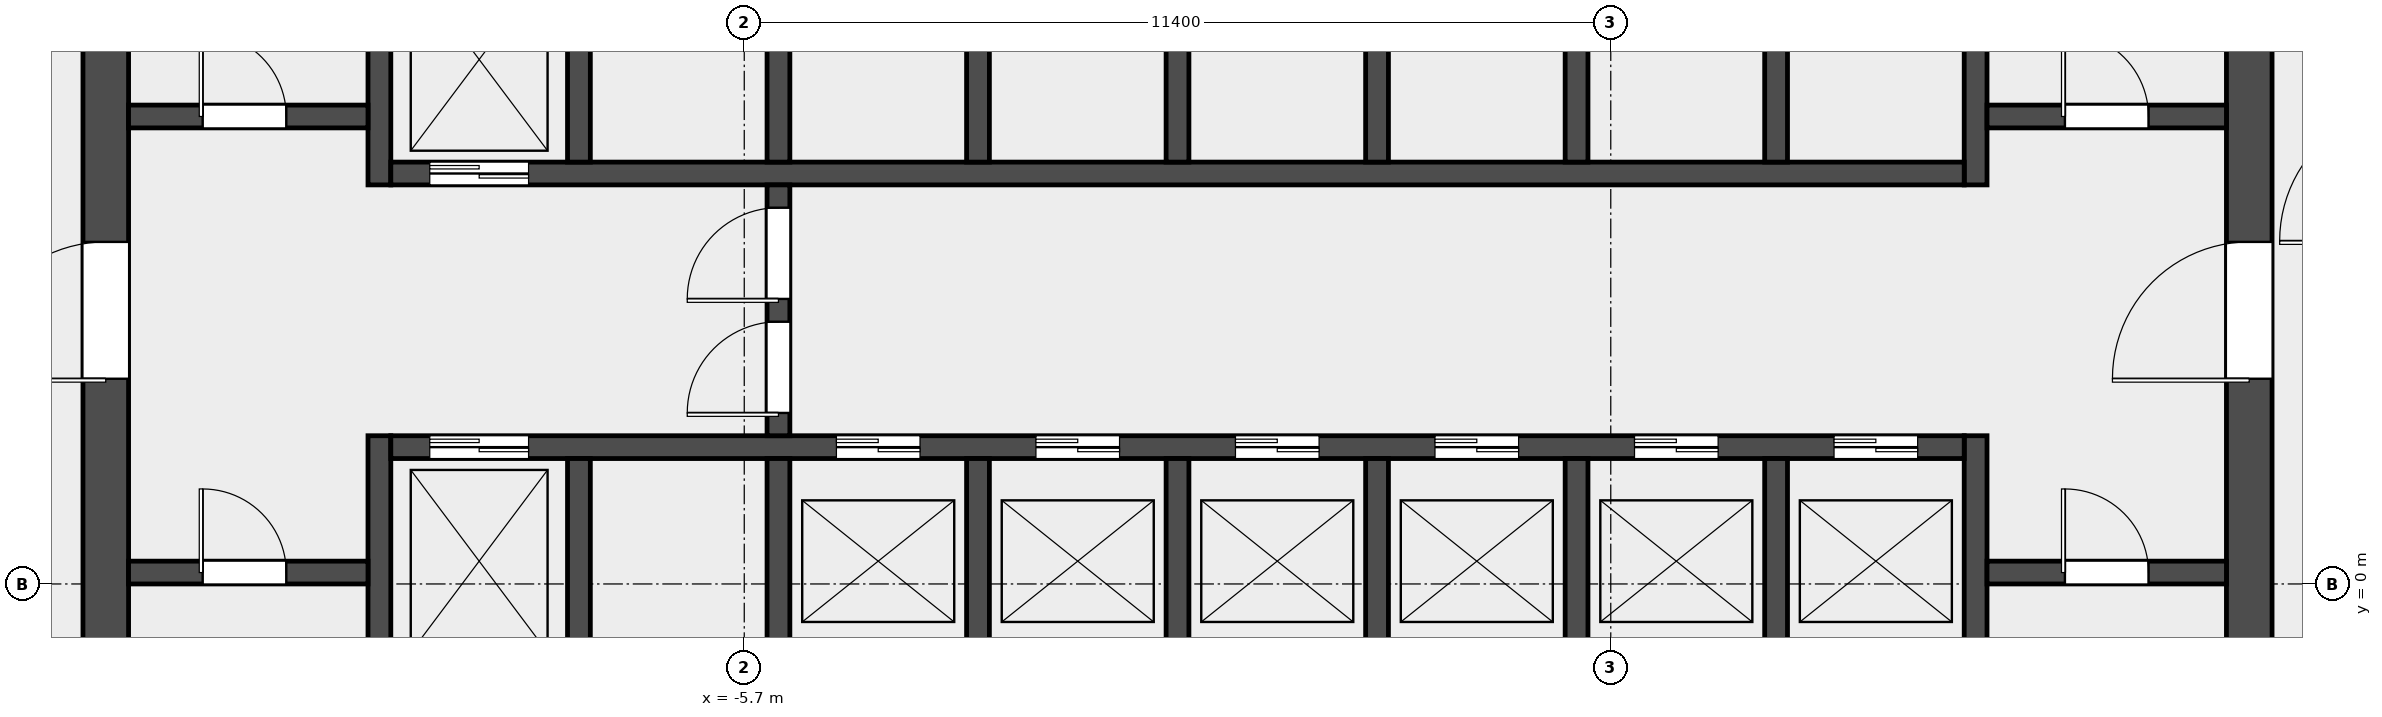
"""IFC4 building model, lengths in metres.
Left out: names, types, materials, properties, quantities, classifications, styles, units other than length and angle.
Written with IfcOpenShell. Run it as: python <this file> out.ifc"""

import sys

from ifc_helpers import new_model, si_unit, direction, frame, frame_2d, origin, place, context, subcontext, project, spatial, rectangle, extrude, element, fill, save


model = new_model("IFC4")
c1 = context("Model", 3, precision=1e-05, world=origin(), true_north=direction((0.0, 1.0)))
c2 = subcontext(c1, "Body", "Model", "MODEL_VIEW")
j1 = project(units=[si_unit("LENGTHUNIT", "METRE"), si_unit("PLANEANGLEUNIT", "RADIAN")], contexts=[c1])
p1 = place(None, origin())
s1 = spatial("IfcSite", under=j1, at=p1, CompositionType="ELEMENT")
p2 = place(p1, origin())
s2 = spatial("IfcBuilding", under=s1, at=p2, CompositionType="ELEMENT")
p3 = place(p2, frame((0.0, 0.0, 112.6)))
s3 = spatial("IfcBuildingStorey", under=s2, at=p3, CompositionType="ELEMENT", Elevation=112.6)
p4 = place(p3, frame((-14.1, -6.6, 0.0), z_axis=(0.0, 0.0, 1.0), x_axis=(0.0, 1.0, 0.0)))
e1 = element("IfcWall", 1, at=p4, inside=s3, PredefinedType="SHEAR", context=c2, shape_type="SweptSolid", body=[
    extrude(rectangle(XDim=19.5, YDim=0.6, at=frame_2d((9.75, 0.0))), origin(), (0.0, 0.0, 1.0), 4.2),
])
p5 = place(p4, frame((9.3, 0.0, 0.0)))
e2 = element("IfcOpeningElement", 2, at=p5, cuts=e1, PredefinedType="OPENING", context=c2, shape_type="SweptSolid", body=[
    extrude(rectangle(XDim=1.8, YDim=2.1, at=frame_2d((0.9, 1.05))), frame((0.0, 0.312, 0.0), z_axis=(0.0, -1.0, 0.0), x_axis=(1.0, 0.0, 0.0)), (0.0, 0.0, 1.0), 0.624),
])
p6 = place(p3, frame((14.1, -6.6, 0.0), z_axis=(0.0, 0.0, 1.0), x_axis=(0.0, 1.0, 0.0)))
e3 = element("IfcWall", 3, at=p6, inside=s3, PredefinedType="SHEAR", context=c2, shape_type="SweptSolid", body=[
    extrude(rectangle(XDim=19.5, YDim=0.6, at=frame_2d((9.75, 0.0))), origin(), (0.0, 0.0, 1.0), 4.2),
])
p7 = place(p6, frame((9.3, 0.0, 0.0)))
e4 = element("IfcOpeningElement", 4, at=p7, cuts=e3, PredefinedType="OPENING", context=c2, shape_type="SweptSolid", body=[
    extrude(rectangle(XDim=1.8, YDim=2.1, at=frame_2d((0.9, 1.05))), frame((0.0, 0.312, 0.0), z_axis=(0.0, -1.0, 0.0), x_axis=(1.0, 0.0, 0.0)), (0.0, 0.0, 1.0), 0.624),
])
p8 = place(p3, frame((-10.5, -6.6, 0.0), z_axis=(0.0, 0.0, 1.0), x_axis=(0.0, 1.0, 0.0)))
e5 = element("IfcWall", 5, at=p8, inside=s3, PredefinedType="SHEAR", context=c2, shape_type="SweptSolid", body=[
    extrude(rectangle(XDim=8.55, YDim=0.3, at=frame_2d((4.275, 0.0))), origin(), (0.0, 0.0, 1.0), 4.2),
])
p9 = place(p3, frame((-10.5, 5.25, 0.0), z_axis=(0.0, 0.0, 1.0), x_axis=(0.0, 1.0, 0.0)))
e6 = element("IfcWall", 6, at=p9, inside=s3, PredefinedType="SHEAR", context=c2, shape_type="SweptSolid", body=[
    extrude(rectangle(XDim=7.65, YDim=0.3, at=frame_2d((3.825, 0.0))), origin(), (0.0, 0.0, 1.0), 4.2),
])
p10 = place(p3, frame((10.5, -6.6, 0.0), z_axis=(0.0, 0.0, 1.0), x_axis=(0.0, 1.0, 0.0)))
e7 = element("IfcWall", 7, at=p10, inside=s3, PredefinedType="SHEAR", context=c2, shape_type="SweptSolid", body=[
    extrude(rectangle(XDim=8.55, YDim=0.3, at=frame_2d((4.275, 0.0))), origin(), (0.0, 0.0, 1.0), 4.2),
])
p11 = place(p3, frame((10.5, 5.25, 0.0), z_axis=(0.0, 0.0, 1.0), x_axis=(0.0, 1.0, 0.0)))
e8 = element("IfcWall", 8, at=p11, inside=s3, PredefinedType="SHEAR", context=c2, shape_type="SweptSolid", body=[
    extrude(rectangle(XDim=7.65, YDim=0.3, at=frame_2d((3.825, 0.0))), origin(), (0.0, 0.0, 1.0), 4.2),
])
p12 = place(p3, frame((-13.8, 0.15, 0.0), z_axis=(0.0, 0.0, 1.0), x_axis=(1.0, 0.0, 0.0)))
e9 = element("IfcWall", 9, at=p12, inside=s3, PredefinedType="SOLIDWALL", context=c2, shape_type="SweptSolid", body=[
    extrude(rectangle(XDim=3.15, YDim=0.3, at=frame_2d((1.575, 0.0))), origin(), (0.0, 0.0, 1.0), 4.2),
])
p13 = place(p12, frame((0.975, 0.0, 0.0)))
e10 = element("IfcOpeningElement", 10, at=p13, cuts=e9, PredefinedType="OPENING", context=c2, shape_type="SweptSolid", body=[
    extrude(rectangle(XDim=1.1, YDim=2.1, at=frame_2d((0.55, 1.05))), frame((0.0, 0.162, 0.0), z_axis=(0.0, -1.0, 0.0), x_axis=(1.0, 0.0, 0.0)), (0.0, 0.0, 1.0), 0.324),
])
p14 = place(p3, frame((-13.8, 6.15, 0.0), z_axis=(0.0, 0.0, 1.0), x_axis=(1.0, 0.0, 0.0)))
e11 = element("IfcWall", 11, at=p14, inside=s3, PredefinedType="SOLIDWALL", context=c2, shape_type="SweptSolid", body=[
    extrude(rectangle(XDim=3.15, YDim=0.3, at=frame_2d((1.575, 0.0))), origin(), (0.0, 0.0, 1.0), 4.2),
])
p15 = place(p14, frame((0.975, 0.0, 0.0)))
e12 = element("IfcOpeningElement", 12, at=p15, cuts=e11, PredefinedType="OPENING", context=c2, shape_type="SweptSolid", body=[
    extrude(rectangle(XDim=1.1, YDim=2.1, at=frame_2d((0.55, 1.05))), frame((0.0, 0.162, 0.0), z_axis=(0.0, -1.0, 0.0), x_axis=(1.0, 0.0, 0.0)), (0.0, 0.0, 1.0), 0.324),
])
p16 = place(p3, frame((10.65, 0.15, 0.0), z_axis=(0.0, 0.0, 1.0), x_axis=(1.0, 0.0, 0.0)))
e13 = element("IfcWall", 13, at=p16, inside=s3, PredefinedType="SOLIDWALL", context=c2, shape_type="SweptSolid", body=[
    extrude(rectangle(XDim=3.15, YDim=0.3, at=frame_2d((1.575, 0.0))), origin(), (0.0, 0.0, 1.0), 4.2),
])
p17 = place(p16, frame((1.025, 0.0, 0.0)))
e14 = element("IfcOpeningElement", 14, at=p17, cuts=e13, PredefinedType="OPENING", context=c2, shape_type="SweptSolid", body=[
    extrude(rectangle(XDim=1.1, YDim=2.1, at=frame_2d((0.55, 1.05))), frame((0.0, 0.162, 0.0), z_axis=(0.0, -1.0, 0.0), x_axis=(1.0, 0.0, 0.0)), (0.0, 0.0, 1.0), 0.324),
])
p18 = place(p3, frame((10.65, 6.15, 0.0), z_axis=(0.0, 0.0, 1.0), x_axis=(1.0, 0.0, 0.0)))
e15 = element("IfcWall", 15, at=p18, inside=s3, PredefinedType="SOLIDWALL", context=c2, shape_type="SweptSolid", body=[
    extrude(rectangle(XDim=3.15, YDim=0.3, at=frame_2d((1.575, 0.0))), origin(), (0.0, 0.0, 1.0), 4.2),
])
p19 = place(p18, frame((1.025, 0.0, 0.0)))
e16 = element("IfcOpeningElement", 16, at=p19, cuts=e15, PredefinedType="OPENING", context=c2, shape_type="SweptSolid", body=[
    extrude(rectangle(XDim=1.1, YDim=2.1, at=frame_2d((0.55, 1.05))), frame((0.0, 0.162, 0.0), z_axis=(0.0, -1.0, 0.0), x_axis=(1.0, 0.0, 0.0)), (0.0, 0.0, 1.0), 0.324),
])
p20 = place(p3, frame((-10.35, 1.8, 0.0), z_axis=(0.0, 0.0, 1.0), x_axis=(1.0, 0.0, 0.0)))
e17 = element("IfcWall", 17, at=p20, inside=s3, PredefinedType="SOLIDWALL", context=c2, shape_type="SweptSolid", body=[
    extrude(rectangle(XDim=20.7, YDim=0.3, at=frame_2d((10.35, 0.0))), origin(), (0.0, 0.0, 1.0), 4.2),
])
p21 = place(p20, frame((0.512, 0.0, 0.0)))
e18 = element("IfcOpeningElement", 18, at=p21, cuts=e17, PredefinedType="OPENING", context=c2, shape_type="SweptSolid", body=[
    extrude(rectangle(XDim=1.3, YDim=2.1, at=frame_2d((0.65, 1.05))), frame((0.0, 0.162, 0.0), z_axis=(0.0, -1.0, 0.0), x_axis=(1.0, 0.0, 0.0)), (0.0, 0.0, 1.0), 0.324),
])
p22 = place(p20, frame((5.863, 0.0, 0.0)))
e19 = element("IfcOpeningElement", 19, at=p22, cuts=e17, PredefinedType="OPENING", context=c2, shape_type="SweptSolid", body=[
    extrude(rectangle(XDim=1.1, YDim=2.1, at=frame_2d((0.55, 1.05))), frame((0.0, 0.162, 0.0), z_axis=(0.0, -1.0, 0.0), x_axis=(1.0, 0.0, 0.0)), (0.0, 0.0, 1.0), 0.324),
])
p23 = place(p20, frame((8.488, 0.0, 0.0)))
e20 = element("IfcOpeningElement", 20, at=p23, cuts=e17, PredefinedType="OPENING", context=c2, shape_type="SweptSolid", body=[
    extrude(rectangle(XDim=1.1, YDim=2.1, at=frame_2d((0.55, 1.05))), frame((0.0, 0.162, 0.0), z_axis=(0.0, -1.0, 0.0), x_axis=(1.0, 0.0, 0.0)), (0.0, 0.0, 1.0), 0.324),
])
p24 = place(p20, frame((11.113, 0.0, 0.0)))
e21 = element("IfcOpeningElement", 21, at=p24, cuts=e17, PredefinedType="OPENING", context=c2, shape_type="SweptSolid", body=[
    extrude(rectangle(XDim=1.1, YDim=2.1, at=frame_2d((0.55, 1.05))), frame((0.0, 0.162, 0.0), z_axis=(0.0, -1.0, 0.0), x_axis=(1.0, 0.0, 0.0)), (0.0, 0.0, 1.0), 0.324),
])
p25 = place(p20, frame((13.738, 0.0, 0.0)))
e22 = element("IfcOpeningElement", 22, at=p25, cuts=e17, PredefinedType="OPENING", context=c2, shape_type="SweptSolid", body=[
    extrude(rectangle(XDim=1.1, YDim=2.1, at=frame_2d((0.55, 1.05))), frame((0.0, 0.162, 0.0), z_axis=(0.0, -1.0, 0.0), x_axis=(1.0, 0.0, 0.0)), (0.0, 0.0, 1.0), 0.324),
])
p26 = place(p20, frame((16.363, 0.0, 0.0)))
e23 = element("IfcOpeningElement", 23, at=p26, cuts=e17, PredefinedType="OPENING", context=c2, shape_type="SweptSolid", body=[
    extrude(rectangle(XDim=1.1, YDim=2.1, at=frame_2d((0.55, 1.05))), frame((0.0, 0.162, 0.0), z_axis=(0.0, -1.0, 0.0), x_axis=(1.0, 0.0, 0.0)), (0.0, 0.0, 1.0), 0.324),
])
p27 = place(p20, frame((18.988, 0.0, 0.0)))
e24 = element("IfcOpeningElement", 24, at=p27, cuts=e17, PredefinedType="OPENING", context=c2, shape_type="SweptSolid", body=[
    extrude(rectangle(XDim=1.1, YDim=2.1, at=frame_2d((0.55, 1.05))), frame((0.0, 0.162, 0.0), z_axis=(0.0, -1.0, 0.0), x_axis=(1.0, 0.0, 0.0)), (0.0, 0.0, 1.0), 0.324),
])
p28 = place(p3, frame((-10.35, 5.4, 0.0), z_axis=(0.0, 0.0, 1.0), x_axis=(1.0, 0.0, 0.0)))
e25 = element("IfcWall", 25, at=p28, inside=s3, PredefinedType="SOLIDWALL", context=c2, shape_type="SweptSolid", body=[
    extrude(rectangle(XDim=20.7, YDim=0.3, at=frame_2d((10.35, 0.0))), origin(), (0.0, 0.0, 1.0), 4.2),
])
p29 = place(p28, frame((0.512, 0.0, 0.0)))
e26 = element("IfcOpeningElement", 26, at=p29, cuts=e25, PredefinedType="OPENING", context=c2, shape_type="SweptSolid", body=[
    extrude(rectangle(XDim=1.3, YDim=2.1, at=frame_2d((0.65, 1.05))), frame((0.0, 0.162, 0.0), z_axis=(0.0, -1.0, 0.0), x_axis=(1.0, 0.0, 0.0)), (0.0, 0.0, 1.0), 0.324),
])
for number, where, z_axis, x_axis in (
    (27, (-7.875, -1.05, 0.0), (0.0, 0.0, 1.0), (0.0, 1.0, 0.0)),
    (28, (-5.25, -1.05, 0.0), (0.0, 0.0, 1.0), (0.0, 1.0, 0.0)),
    (29, (-2.625, -1.05, 0.0), (0.0, 0.0, 1.0), (0.0, 1.0, 0.0)),
    (30, (0.0, -1.05, 0.0), (0.0, 0.0, 1.0), (0.0, 1.0, 0.0)),
    (31, (2.625, -1.05, 0.0), (0.0, 0.0, 1.0), (0.0, 1.0, 0.0)),
    (32, (5.25, -1.05, 0.0), (0.0, 0.0, 1.0), (0.0, 1.0, 0.0)),
    (33, (7.875, -1.05, 0.0), (0.0, 0.0, 1.0), (0.0, 1.0, 0.0)),
    (34, (-7.875, 5.55, 0.0), (0.0, 0.0, 1.0), (0.0, 1.0, 0.0)),
    (35, (-5.25, 5.55, 0.0), (0.0, 0.0, 1.0), (0.0, 1.0, 0.0)),
    (36, (-2.625, 5.55, 0.0), (0.0, 0.0, 1.0), (0.0, 1.0, 0.0)),
    (37, (0.0, 5.55, 0.0), (0.0, 0.0, 1.0), (0.0, 1.0, 0.0)),
    (38, (2.625, 5.55, 0.0), (0.0, 0.0, 1.0), (0.0, 1.0, 0.0)),
    (39, (5.25, 5.55, 0.0), (0.0, 0.0, 1.0), (0.0, 1.0, 0.0)),
    (40, (7.875, 5.55, 0.0), (0.0, 0.0, 1.0), (0.0, 1.0, 0.0)),
):
    element("IfcWall", number, at=place(p3, frame(where, z_axis=z_axis, x_axis=x_axis)), inside=s3, PredefinedType="SOLIDWALL", context=c2, shape_type="SweptSolid", body=[
        extrude(rectangle(XDim=2.7, YDim=0.3, at=frame_2d((1.35, 0.0))), origin(), (0.0, 0.0, 1.0), 4.2),
    ])
p30 = place(p3, frame((-5.25, 1.95, 0.0), z_axis=(0.0, 0.0, 1.0), x_axis=(0.0, 1.0, 0.0)))
e41 = element("IfcWall", 41, at=p30, inside=s3, PredefinedType="SOLIDWALL", context=c2, shape_type="SweptSolid", body=[
    extrude(rectangle(XDim=3.3, YDim=0.3, at=frame_2d((1.65, 0.0))), origin(), (0.0, 0.0, 1.0), 4.2),
])
p31 = place(p30, frame((0.3, 0.0, 0.0)))
e42 = element("IfcOpeningElement", 42, at=p31, cuts=e41, PredefinedType="OPENING", context=c2, shape_type="SweptSolid", body=[
    extrude(rectangle(XDim=1.2, YDim=2.1, at=frame_2d((0.6, 1.05))), frame((0.0, 0.162, 0.0), z_axis=(0.0, -1.0, 0.0), x_axis=(1.0, 0.0, 0.0)), (0.0, 0.0, 1.0), 0.324),
])
p32 = place(p30, frame((1.8, 0.0, 0.0)))
e43 = element("IfcOpeningElement", 43, at=p32, cuts=e41, PredefinedType="OPENING", context=c2, shape_type="SweptSolid", body=[
    extrude(rectangle(XDim=1.2, YDim=2.1, at=frame_2d((0.6, 1.05))), frame((0.0, 0.162, 0.0), z_axis=(0.0, -1.0, 0.0), x_axis=(1.0, 0.0, 0.0)), (0.0, 0.0, 1.0), 0.324),
])
p33 = place(p13, origin())
e44 = element("IfcDoor", 44, at=p33, inside=s3, OperationType="SINGLE_SWING_LEFT", PredefinedType="DOOR", context=c2, shape_type="SweptSolid", body=[
    extrude(rectangle(XDim=1.1, YDim=2.1, at=frame_2d((0.55, 1.05))), frame((0.0, 0.025, 0.0), z_axis=(0.0, -1.0, 0.0), x_axis=(1.0, 0.0, 0.0)), (0.0, 0.0, 1.0), 0.05),
])
fill(e10, e44)
p34 = place(p15, origin())
e45 = element("IfcDoor", 45, at=p34, inside=s3, OperationType="SINGLE_SWING_LEFT", PredefinedType="DOOR", context=c2, shape_type="SweptSolid", body=[
    extrude(rectangle(XDim=1.1, YDim=2.1, at=frame_2d((0.55, 1.05))), frame((0.0, 0.025, 0.0), z_axis=(0.0, -1.0, 0.0), x_axis=(1.0, 0.0, 0.0)), (0.0, 0.0, 1.0), 0.05),
])
fill(e12, e45)
p35 = place(p17, origin())
e46 = element("IfcDoor", 46, at=p35, inside=s3, OperationType="SINGLE_SWING_RIGHT", PredefinedType="DOOR", context=c2, shape_type="SweptSolid", body=[
    extrude(rectangle(XDim=1.1, YDim=2.1, at=frame_2d((0.55, 1.05))), frame((0.0, 0.025, 0.0), z_axis=(0.0, -1.0, 0.0), x_axis=(1.0, 0.0, 0.0)), (0.0, 0.0, 1.0), 0.05),
])
fill(e14, e46)
p36 = place(p19, origin())
e47 = element("IfcDoor", 47, at=p36, inside=s3, OperationType="SINGLE_SWING_RIGHT", PredefinedType="DOOR", context=c2, shape_type="SweptSolid", body=[
    extrude(rectangle(XDim=1.1, YDim=2.1, at=frame_2d((0.55, 1.05))), frame((0.0, 0.025, 0.0), z_axis=(0.0, -1.0, 0.0), x_axis=(1.0, 0.0, 0.0)), (0.0, 0.0, 1.0), 0.05),
])
fill(e16, e47)
p37 = place(p5, origin())
e48 = element("IfcDoor", 48, at=p37, inside=s3, OperationType="DOUBLE_DOOR_SINGLE_SWING", PredefinedType="DOOR", context=c2, shape_type="SweptSolid", body=[
    extrude(rectangle(XDim=1.8, YDim=2.1, at=frame_2d((0.9, 1.05))), frame((0.0, 0.025, 0.0), z_axis=(0.0, -1.0, 0.0), x_axis=(1.0, 0.0, 0.0)), (0.0, 0.0, 1.0), 0.05),
])
fill(e2, e48)
p38 = place(p7, origin())
e49 = element("IfcDoor", 49, at=p38, inside=s3, OperationType="DOUBLE_DOOR_SINGLE_SWING", PredefinedType="DOOR", context=c2, shape_type="SweptSolid", body=[
    extrude(rectangle(XDim=1.8, YDim=2.1, at=frame_2d((0.9, 1.05))), frame((0.0, 0.025, 0.0), z_axis=(0.0, -1.0, 0.0), x_axis=(1.0, 0.0, 0.0)), (0.0, 0.0, 1.0), 0.05),
])
fill(e4, e49)
p39 = place(p31, origin())
e50 = element("IfcDoor", 50, at=p39, inside=s3, OperationType="SINGLE_SWING_LEFT", PredefinedType="DOOR", context=c2, shape_type="SweptSolid", body=[
    extrude(rectangle(XDim=1.2, YDim=2.1, at=frame_2d((0.6, 1.05))), frame((0.0, 0.025, 0.0), z_axis=(0.0, -1.0, 0.0), x_axis=(1.0, 0.0, 0.0)), (0.0, 0.0, 1.0), 0.05),
])
fill(e42, e50)
p40 = place(p32, origin())
e51 = element("IfcDoor", 51, at=p40, inside=s3, OperationType="SINGLE_SWING_RIGHT", PredefinedType="DOOR", context=c2, shape_type="SweptSolid", body=[
    extrude(rectangle(XDim=1.2, YDim=2.1, at=frame_2d((0.6, 1.05))), frame((0.0, 0.025, 0.0), z_axis=(0.0, -1.0, 0.0), x_axis=(1.0, 0.0, 0.0)), (0.0, 0.0, 1.0), 0.05),
])
fill(e43, e51)
p41 = place(p21, origin())
e52 = element("IfcDoor", 52, at=p41, inside=s3, OperationType="DOUBLE_DOOR_SLIDING", PredefinedType="DOOR", context=c2, shape_type="SweptSolid", body=[
    extrude(rectangle(XDim=1.3, YDim=2.1, at=frame_2d((0.65, 1.05))), frame((0.0, 0.025, 0.0), z_axis=(0.0, -1.0, 0.0), x_axis=(1.0, 0.0, 0.0)), (0.0, 0.0, 1.0), 0.05),
])
fill(e18, e52)
p42 = place(p22, origin())
e53 = element("IfcDoor", 53, at=p42, inside=s3, OperationType="DOUBLE_DOOR_SLIDING", PredefinedType="DOOR", context=c2, shape_type="SweptSolid", body=[
    extrude(rectangle(XDim=1.1, YDim=2.1, at=frame_2d((0.55, 1.05))), frame((0.0, 0.025, 0.0), z_axis=(0.0, -1.0, 0.0), x_axis=(1.0, 0.0, 0.0)), (0.0, 0.0, 1.0), 0.05),
])
fill(e19, e53)
p43 = place(p23, origin())
e54 = element("IfcDoor", 54, at=p43, inside=s3, OperationType="DOUBLE_DOOR_SLIDING", PredefinedType="DOOR", context=c2, shape_type="SweptSolid", body=[
    extrude(rectangle(XDim=1.1, YDim=2.1, at=frame_2d((0.55, 1.05))), frame((0.0, 0.025, 0.0), z_axis=(0.0, -1.0, 0.0), x_axis=(1.0, 0.0, 0.0)), (0.0, 0.0, 1.0), 0.05),
])
fill(e20, e54)
p44 = place(p24, origin())
e55 = element("IfcDoor", 55, at=p44, inside=s3, OperationType="DOUBLE_DOOR_SLIDING", PredefinedType="DOOR", context=c2, shape_type="SweptSolid", body=[
    extrude(rectangle(XDim=1.1, YDim=2.1, at=frame_2d((0.55, 1.05))), frame((0.0, 0.025, 0.0), z_axis=(0.0, -1.0, 0.0), x_axis=(1.0, 0.0, 0.0)), (0.0, 0.0, 1.0), 0.05),
])
fill(e21, e55)
p45 = place(p25, origin())
e56 = element("IfcDoor", 56, at=p45, inside=s3, OperationType="DOUBLE_DOOR_SLIDING", PredefinedType="DOOR", context=c2, shape_type="SweptSolid", body=[
    extrude(rectangle(XDim=1.1, YDim=2.1, at=frame_2d((0.55, 1.05))), frame((0.0, 0.025, 0.0), z_axis=(0.0, -1.0, 0.0), x_axis=(1.0, 0.0, 0.0)), (0.0, 0.0, 1.0), 0.05),
])
fill(e22, e56)
p46 = place(p26, origin())
e57 = element("IfcDoor", 57, at=p46, inside=s3, OperationType="DOUBLE_DOOR_SLIDING", PredefinedType="DOOR", context=c2, shape_type="SweptSolid", body=[
    extrude(rectangle(XDim=1.1, YDim=2.1, at=frame_2d((0.55, 1.05))), frame((0.0, 0.025, 0.0), z_axis=(0.0, -1.0, 0.0), x_axis=(1.0, 0.0, 0.0)), (0.0, 0.0, 1.0), 0.05),
])
fill(e23, e57)
p47 = place(p27, origin())
e58 = element("IfcDoor", 58, at=p47, inside=s3, OperationType="DOUBLE_DOOR_SLIDING", PredefinedType="DOOR", context=c2, shape_type="SweptSolid", body=[
    extrude(rectangle(XDim=1.1, YDim=2.1, at=frame_2d((0.55, 1.05))), frame((0.0, 0.025, 0.0), z_axis=(0.0, -1.0, 0.0), x_axis=(1.0, 0.0, 0.0)), (0.0, 0.0, 1.0), 0.05),
])
fill(e24, e58)
p48 = place(p29, origin())
e59 = element("IfcDoor", 59, at=p48, inside=s3, OperationType="DOUBLE_DOOR_SLIDING", PredefinedType="DOOR", context=c2, shape_type="SweptSolid", body=[
    extrude(rectangle(XDim=1.3, YDim=2.1, at=frame_2d((0.65, 1.05))), frame((0.0, 0.025, 0.0), z_axis=(0.0, -1.0, 0.0), x_axis=(1.0, 0.0, 0.0)), (0.0, 0.0, 1.0), 0.05),
])
fill(e26, e59)
save(model, sys.argv[1])
